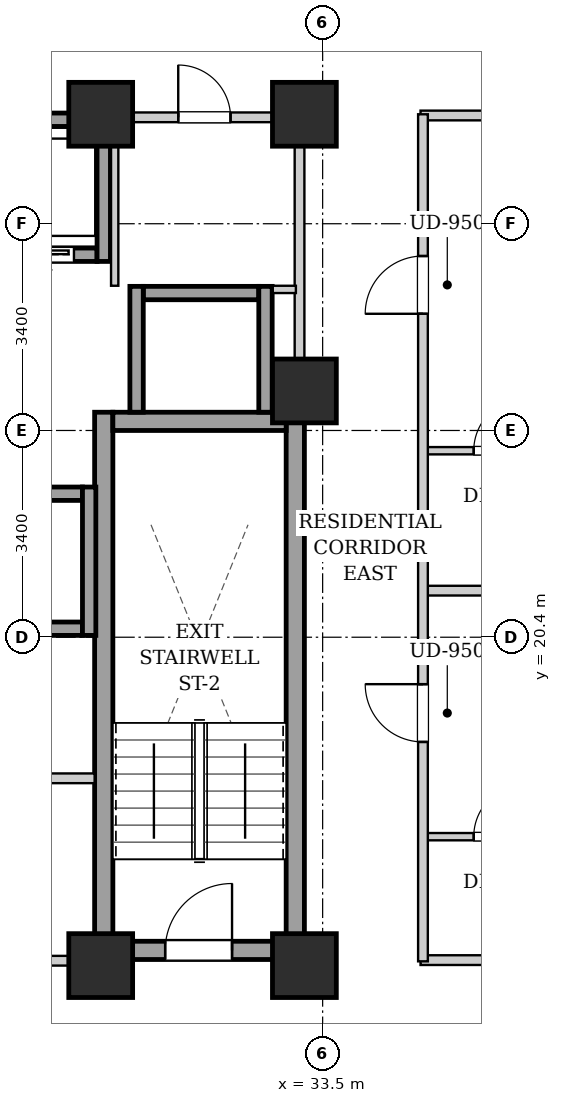
"""IFC4 building model, lengths in metres.
Left out: names, types, materials, properties, quantities, classifications, styles, units other than length and angle.
Written with IfcOpenShell. Run it as: python <this file> out.ifc"""

import sys

from ifc_helpers import new_model, si_unit, direction, frame, frame_2d, origin, origin_2d, place, context, subcontext, project, spatial, rectangle, extrude, element, fill, save


model = new_model("IFC4")
c1 = context("Model", 3, precision=1e-05, world=origin(), true_north=direction((0.0, 1.0)))
c2 = subcontext(c1, "Body", "Model", "MODEL_VIEW")
j1 = project(units=[si_unit("LENGTHUNIT", "METRE"), si_unit("PLANEANGLEUNIT", "RADIAN")], contexts=[c1])
p1 = place(None, origin())
s1 = spatial("IfcSite", under=j1, at=p1, CompositionType="ELEMENT")
p2 = place(p1, origin())
s2 = spatial("IfcBuilding", under=s1, at=p2, CompositionType="ELEMENT")
p3 = place(p2, frame((0.0, 0.0, 107.1)))
s3 = spatial("IfcBuildingStorey", under=s2, at=p3, CompositionType="ELEMENT", Elevation=107.1)
for number, where, z_axis, x_axis in (
    (1, (29.85, 15.0, 0.0), (0.0, 0.0, 1.0), (1.0, 0.0, 0.0)),
    (2, (33.2, 15.0, 0.0), (0.0, 0.0, 1.0), (1.0, 0.0, 0.0)),
    (3, (29.85, 29.0, 0.0), (0.0, 0.0, 1.0), (1.0, 0.0, 0.0)),
    (4, (33.2, 29.0, 0.0), (0.0, 0.0, 1.0), (1.0, 0.0, 0.0)),
    (5, (33.2, 24.45, 0.0), (0.0, 0.0, 1.0), (1.0, 0.0, 0.0)),
):
    element("IfcColumn", number, at=place(p3, frame(where, z_axis=z_axis, x_axis=x_axis)), inside=s3, PredefinedType="COLUMN", context=c2, shape_type="SweptSolid", body=[
        extrude(rectangle(XDim=1.05, YDim=1.05, at=origin_2d()), origin(), (0.0, 0.0, 1.0), 3.2),
    ])
for number, where, z_axis, x_axis in (
    (6, (29.9, 15.1, 0.0), (0.0, 0.0, 1.0), (0.0, 1.0, 0.0)),
    (7, (33.05, 15.1, 0.0), (0.0, 0.0, 1.0), (0.0, 1.0, 0.0)),
):
    element("IfcWall", number, at=place(p3, frame(where, z_axis=z_axis, x_axis=x_axis)), inside=s3, PredefinedType="SHEAR", context=c2, shape_type="SweptSolid", body=[
        extrude(rectangle(XDim=9.0, YDim=0.3, at=frame_2d((4.5, 0.0))), origin(), (0.0, 0.0, 1.0), 2.94),
    ])
p4 = place(p3, frame((30.05, 23.95, 0.0), z_axis=(0.0, 0.0, 1.0), x_axis=(1.0, 0.0, 0.0)))
e8 = element("IfcWall", 8, at=p4, inside=s3, PredefinedType="SHEAR", context=c2, shape_type="SweptSolid", body=[
    extrude(rectangle(XDim=2.85, YDim=0.3, at=frame_2d((1.425, 0.0))), origin(), (0.0, 0.0, 1.0), 2.94),
])
p5 = place(p3, frame((30.05, 15.25, 0.0), z_axis=(0.0, 0.0, 1.0), x_axis=(1.0, 0.0, 0.0)))
e9 = element("IfcWall", 9, at=p5, inside=s3, PredefinedType="SHEAR", context=c2, shape_type="SweptSolid", body=[
    extrude(rectangle(XDim=2.85, YDim=0.3, at=frame_2d((1.425, 0.0))), origin(), (0.0, 0.0, 1.0), 2.94),
])
p6 = place(p5, frame((0.86, 0.0, 0.0)))
e10 = element("IfcOpeningElement", 10, at=p6, cuts=e9, PredefinedType="OPENING", context=c2, shape_type="SweptSolid", body=[
    extrude(rectangle(XDim=1.1, YDim=2.05, at=frame_2d((0.55, 1.025))), frame((0.0, 0.16, 0.0), z_axis=(0.0, -1.0, 0.0), x_axis=(1.0, 0.0, 0.0)), (0.0, 0.0, 1.0), 0.32),
])
p7 = place(p3, frame((27.93, 26.69, 0.0), z_axis=(0.0, 0.0, 1.0), x_axis=(1.0, 0.0, 0.0)))
e11 = element("IfcWall", 11, at=p7, inside=s3, PredefinedType="SHEAR", context=c2, shape_type="SweptSolid", body=[
    extrude(rectangle(XDim=1.86, YDim=0.22, at=frame_2d((0.93, 0.0))), origin(), (0.0, 0.0, 1.0), 2.94),
])
p8 = place(p7, frame((0.38, 0.0, 0.0)))
e12 = element("IfcOpeningElement", 12, at=p8, cuts=e11, PredefinedType="OPENING", context=c2, shape_type="SweptSolid", body=[
    extrude(rectangle(XDim=1.1, YDim=2.15, at=frame_2d((0.55, 1.075))), frame((0.0, 0.12, 0.0), z_axis=(0.0, -1.0, 0.0), x_axis=(1.0, 0.0, 0.0)), (0.0, 0.0, 1.0), 0.24),
])
p9 = place(p3, frame((27.93, 28.91, 0.0), z_axis=(0.0, 0.0, 1.0), x_axis=(1.0, 0.0, 0.0)))
e13 = element("IfcWall", 13, at=p9, inside=s3, PredefinedType="SHEAR", context=c2, shape_type="SweptSolid", body=[
    extrude(rectangle(XDim=1.86, YDim=0.22, at=frame_2d((0.93, 0.0))), origin(), (0.0, 0.0, 1.0), 2.94),
])
p10 = place(p3, frame((29.9, 26.58, 0.0), z_axis=(0.0, 0.0, 1.0), x_axis=(0.0, 1.0, 0.0)))
e14 = element("IfcWall", 14, at=p10, inside=s3, PredefinedType="SHEAR", context=c2, shape_type="SweptSolid", body=[
    extrude(rectangle(XDim=2.44, YDim=0.22, at=frame_2d((1.22, 0.0))), origin(), (0.0, 0.0, 1.0), 2.94),
])
for number, where, z_axis, x_axis in (
    (15, (27.65, 20.54, 0.0), (0.0, 0.0, 1.0), (1.0, 0.0, 0.0)),
    (16, (27.65, 22.76, 0.0), (0.0, 0.0, 1.0), (1.0, 0.0, 0.0)),
):
    element("IfcWall", number, at=place(p3, frame(where, z_axis=z_axis, x_axis=x_axis)), inside=s3, PredefinedType="SHEAR", context=c2, shape_type="SweptSolid", body=[
        extrude(rectangle(XDim=1.9, YDim=0.22, at=frame_2d((0.95, 0.0))), origin(), (0.0, 0.0, 1.0), 2.94),
    ])
p11 = place(p3, frame((29.66, 20.43, 0.0), z_axis=(0.0, 0.0, 1.0), x_axis=(0.0, 1.0, 0.0)))
e17 = element("IfcWall", 17, at=p11, inside=s3, PredefinedType="SHEAR", context=c2, shape_type="SweptSolid", body=[
    extrude(rectangle(XDim=2.44, YDim=0.22, at=frame_2d((1.22, 0.0))), origin(), (0.0, 0.0, 1.0), 2.94),
])
p12 = place(p3, frame((30.55, 26.06, 0.0), z_axis=(0.0, 0.0, 1.0), x_axis=(1.0, 0.0, 0.0)))
e18 = element("IfcWall", 18, at=p12, inside=s3, PredefinedType="SHEAR", context=c2, shape_type="SweptSolid", body=[
    extrude(rectangle(XDim=1.9, YDim=0.22, at=frame_2d((0.95, 0.0))), origin(), (0.0, 0.0, 1.0), 2.94),
])
for number, where, z_axis, x_axis in (
    (19, (30.44, 24.1, 0.0), (0.0, 0.0, 1.0), (0.0, 1.0, 0.0)),
    (20, (32.56, 24.1, 0.0), (0.0, 0.0, 1.0), (0.0, 1.0, 0.0)),
):
    element("IfcWall", number, at=place(p3, frame(where, z_axis=z_axis, x_axis=x_axis)), inside=s3, PredefinedType="SHEAR", context=c2, shape_type="SweptSolid", body=[
        extrude(rectangle(XDim=2.07, YDim=0.22, at=frame_2d((1.035, 0.0))), origin(), (0.0, 0.0, 1.0), 2.94),
    ])
p13 = place(p3, frame((21.25, 15.08, 0.0), z_axis=(0.0, 0.0, 1.0), x_axis=(1.0, 0.0, 0.0)))
e21 = element("IfcWall", 21, at=p13, inside=s3, PredefinedType="PARTITIONING", context=c2, shape_type="SweptSolid", body=[
    extrude(rectangle(XDim=8.5, YDim=0.16, at=frame_2d((4.25, 0.0))), origin(), (0.0, 0.0, 1.0), 2.313),
])
p14 = place(p13, frame((3.725, 0.0, 0.0)))
e22 = element("IfcOpeningElement", 22, at=p14, cuts=e21, PredefinedType="OPENING", context=c2, shape_type="SweptSolid", body=[
    extrude(rectangle(XDim=1.05, YDim=2.05, at=frame_2d((0.525, 1.025))), frame((0.0, 0.09, 0.0), z_axis=(0.0, -1.0, 0.0), x_axis=(1.0, 0.0, 0.0)), (0.0, 0.0, 1.0), 0.18),
])
p15 = place(p3, frame((28.65, 18.08, 0.0), z_axis=(0.0, 0.0, 1.0), x_axis=(1.0, 0.0, 0.0)))
e23 = element("IfcWall", 23, at=p15, inside=s3, PredefinedType="PARTITIONING", context=c2, shape_type="SweptSolid", body=[
    extrude(rectangle(XDim=1.1, YDim=0.16, at=frame_2d((0.55, 0.0))), origin(), (0.0, 0.0, 1.0), 2.94),
])
p16 = place(p3, frame((33.12, 24.12, 0.0), z_axis=(0.0, 0.0, 1.0), x_axis=(0.0, 1.0, 0.0)))
e24 = element("IfcWall", 24, at=p16, inside=s3, PredefinedType="PARTITIONING", context=c2, shape_type="SweptSolid", body=[
    extrude(rectangle(XDim=4.76, YDim=0.16, at=frame_2d((2.38, 0.0))), origin(), (0.0, 0.0, 1.0), 2.275),
])
p17 = place(p3, frame((30.08, 26.18, 0.0), z_axis=(0.0, 0.0, 1.0), x_axis=(0.0, 1.0, 0.0)))
e25 = element("IfcWall", 25, at=p17, inside=s3, PredefinedType="PARTITIONING", context=c2, shape_type="SweptSolid", body=[
    extrude(rectangle(XDim=2.68, YDim=0.12, at=frame_2d((1.34, 0.0))), origin(), (0.0, 0.0, 1.0), 2.94),
])
p18 = place(p3, frame((32.68, 26.12, 0.0), z_axis=(0.0, 0.0, 1.0), x_axis=(1.0, 0.0, 0.0)))
e26 = element("IfcWall", 26, at=p18, inside=s3, PredefinedType="PARTITIONING", context=c2, shape_type="SweptSolid", body=[
    extrude(rectangle(XDim=0.38, YDim=0.12, at=frame_2d((0.19, 0.0))), origin(), (0.0, 0.0, 1.0), 2.94),
])
p19 = place(p3, frame((30.08, 28.95, 0.0), z_axis=(0.0, 0.0, 1.0), x_axis=(1.0, 0.0, 0.0)))
e27 = element("IfcWall", 27, at=p19, inside=s3, PredefinedType="PARTITIONING", context=c2, shape_type="SweptSolid", body=[
    extrude(rectangle(XDim=2.96, YDim=0.16, at=frame_2d((1.48, 0.0))), origin(), (0.0, 0.0, 1.0), 2.94),
])
p20 = place(p19, frame((1.045, 0.0, 0.0)))
e28 = element("IfcOpeningElement", 28, at=p20, cuts=e27, PredefinedType="OPENING", context=c2, shape_type="SweptSolid", body=[
    extrude(rectangle(XDim=0.86, YDim=2.05, at=frame_2d((0.43, 1.025))), frame((0.0, 0.09, 0.0), z_axis=(0.0, -1.0, 0.0), x_axis=(1.0, 0.0, 0.0)), (0.0, 0.0, 1.0), 0.18),
])
for number, where, z_axis, x_axis in (
    (29, (35.11, 15.09, 0.0), (0.0, 0.0, 1.0), (1.0, 0.0, 0.0)),
    (30, (35.11, 28.98, 0.0), (0.0, 0.0, 1.0), (1.0, 0.0, 0.0)),
):
    element("IfcWall", number, at=place(p3, frame(where, z_axis=z_axis, x_axis=x_axis)), inside=s3, PredefinedType="PARTITIONING", context=c2, shape_type="SweptSolid", body=[
        extrude(rectangle(XDim=8.01, YDim=0.16, at=frame_2d((4.005, 0.0))), origin(), (0.0, 0.0, 1.0), 2.313),
    ])
p21 = place(p3, frame((35.19, 21.166, 0.0), z_axis=(0.0, 0.0, 1.0), x_axis=(1.0, 0.0, 0.0)))
e31 = element("IfcWall", 31, at=p21, inside=s3, PredefinedType="PARTITIONING", context=c2, shape_type="SweptSolid", body=[
    extrude(rectangle(XDim=7.93, YDim=0.16, at=frame_2d((3.965, 0.0))), origin(), (0.0, 0.0, 1.0), 2.94),
])
p22 = place(p3, frame((35.19, 17.12, 0.0), z_axis=(0.0, 0.0, 1.0), x_axis=(1.0, 0.0, 0.0)))
e32 = element("IfcWall", 32, at=p22, inside=s3, PredefinedType="PARTITIONING", context=c2, shape_type="SweptSolid", body=[
    extrude(rectangle(XDim=2.45, YDim=0.12, at=frame_2d((1.225, 0.0))), origin(), (0.0, 0.0, 1.0), 2.94),
])
p23 = place(p22, frame((0.795, 0.0, 0.0)))
e33 = element("IfcOpeningElement", 33, at=p23, cuts=e32, PredefinedType="OPENING", context=c2, shape_type="SweptSolid", body=[
    extrude(rectangle(XDim=0.86, YDim=2.05, at=frame_2d((0.43, 1.025))), frame((0.0, 0.07, 0.0), z_axis=(0.0, -1.0, 0.0), x_axis=(1.0, 0.0, 0.0)), (0.0, 0.0, 1.0), 0.14),
])
p24 = place(p3, frame((35.19, 23.467, 0.0), z_axis=(0.0, 0.0, 1.0), x_axis=(1.0, 0.0, 0.0)))
e34 = element("IfcWall", 34, at=p24, inside=s3, PredefinedType="PARTITIONING", context=c2, shape_type="SweptSolid", body=[
    extrude(rectangle(XDim=2.45, YDim=0.12, at=frame_2d((1.225, 0.0))), origin(), (0.0, 0.0, 1.0), 2.94),
])
p25 = place(p24, frame((0.795, 0.0, 0.0)))
e35 = element("IfcOpeningElement", 35, at=p25, cuts=e34, PredefinedType="OPENING", context=c2, shape_type="SweptSolid", body=[
    extrude(rectangle(XDim=0.86, YDim=2.05, at=frame_2d((0.43, 1.025))), frame((0.0, 0.07, 0.0), z_axis=(0.0, -1.0, 0.0), x_axis=(1.0, 0.0, 0.0)), (0.0, 0.0, 1.0), 0.14),
])
p26 = place(p3, frame((35.15, 15.07, 0.0), z_axis=(0.0, 0.0, 1.0), x_axis=(0.0, 1.0, 0.0)))
e36 = element("IfcWall", 36, at=p26, inside=s3, PredefinedType="PARTITIONING", context=c2, shape_type="SweptSolid", body=[
    extrude(rectangle(XDim=13.93, YDim=0.16, at=frame_2d((6.965, 0.0))), origin(), (0.0, 0.0, 1.0), 2.94),
])
p27 = place(p26, frame((3.608, 0.0, 0.0)))
e37 = element("IfcOpeningElement", 37, at=p27, cuts=e36, PredefinedType="OPENING", context=c2, shape_type="SweptSolid", body=[
    extrude(rectangle(XDim=0.95, YDim=2.1, at=frame_2d((0.475, 1.05))), frame((0.0, 0.09, 0.0), z_axis=(0.0, -1.0, 0.0), x_axis=(1.0, 0.0, 0.0)), (0.0, 0.0, 1.0), 0.18),
])
p28 = place(p26, frame((10.649, 0.0, 0.0)))
e38 = element("IfcOpeningElement", 38, at=p28, cuts=e36, PredefinedType="OPENING", context=c2, shape_type="SweptSolid", body=[
    extrude(rectangle(XDim=0.95, YDim=2.1, at=frame_2d((0.475, 1.05))), frame((0.0, 0.09, 0.0), z_axis=(0.0, -1.0, 0.0), x_axis=(1.0, 0.0, 0.0)), (0.0, 0.0, 1.0), 0.18),
])
p29 = place(p6, origin())
e39 = element("IfcDoor", 39, at=p29, inside=s3, OperationType="SINGLE_SWING_RIGHT", PredefinedType="DOOR", context=c2, shape_type="SweptSolid", body=[
    extrude(rectangle(XDim=1.1, YDim=2.05, at=frame_2d((0.55, 1.025))), frame((0.0, 0.025, 0.0), z_axis=(0.0, -1.0, 0.0), x_axis=(1.0, 0.0, 0.0)), (0.0, 0.0, 1.0), 0.05),
])
fill(e10, e39)
p30 = place(p8, origin())
e40 = element("IfcDoor", 40, at=p30, inside=s3, OperationType="SLIDING_TO_LEFT", PredefinedType="DOOR", context=c2, shape_type="SweptSolid", body=[
    extrude(rectangle(XDim=1.1, YDim=2.15, at=frame_2d((0.55, 1.075))), frame((0.0, 0.025, 0.0), z_axis=(0.0, -1.0, 0.0), x_axis=(1.0, 0.0, 0.0)), (0.0, 0.0, 1.0), 0.05),
])
fill(e12, e40)
p31 = place(p20, origin())
e41 = element("IfcDoor", 41, at=p31, inside=s3, OperationType="SINGLE_SWING_LEFT", PredefinedType="DOOR", context=c2, shape_type="SweptSolid", body=[
    extrude(rectangle(XDim=0.86, YDim=2.05, at=frame_2d((0.43, 1.025))), frame((0.0, 0.025, 0.0), z_axis=(0.0, -1.0, 0.0), x_axis=(1.0, 0.0, 0.0)), (0.0, 0.0, 1.0), 0.05),
])
fill(e28, e41)
p32 = place(p23, origin())
e42 = element("IfcDoor", 42, at=p32, inside=s3, OperationType="SINGLE_SWING_RIGHT", PredefinedType="DOOR", context=c2, shape_type="SweptSolid", body=[
    extrude(rectangle(XDim=0.86, YDim=2.05, at=frame_2d((0.43, 1.025))), frame((0.0, 0.025, 0.0), z_axis=(0.0, -1.0, 0.0), x_axis=(1.0, 0.0, 0.0)), (0.0, 0.0, 1.0), 0.05),
])
fill(e33, e42)
p33 = place(p25, origin())
e43 = element("IfcDoor", 43, at=p33, inside=s3, OperationType="SINGLE_SWING_RIGHT", PredefinedType="DOOR", context=c2, shape_type="SweptSolid", body=[
    extrude(rectangle(XDim=0.86, YDim=2.05, at=frame_2d((0.43, 1.025))), frame((0.0, 0.025, 0.0), z_axis=(0.0, -1.0, 0.0), x_axis=(1.0, 0.0, 0.0)), (0.0, 0.0, 1.0), 0.05),
])
fill(e35, e43)
p34 = place(p27, origin())
e44 = element("IfcDoor", 44, at=p34, inside=s3, OperationType="SINGLE_SWING_RIGHT", PredefinedType="DOOR", context=c2, shape_type="SweptSolid", body=[
    extrude(rectangle(XDim=0.95, YDim=2.1, at=frame_2d((0.475, 1.05))), frame((0.0, 0.025, 0.0), z_axis=(0.0, -1.0, 0.0), x_axis=(1.0, 0.0, 0.0)), (0.0, 0.0, 1.0), 0.05),
])
fill(e37, e44)
p35 = place(p28, origin())
e45 = element("IfcDoor", 45, at=p35, inside=s3, OperationType="SINGLE_SWING_LEFT", PredefinedType="DOOR", context=c2, shape_type="SweptSolid", body=[
    extrude(rectangle(XDim=0.95, YDim=2.1, at=frame_2d((0.475, 1.05))), frame((0.0, 0.025, 0.0), z_axis=(0.0, -1.0, 0.0), x_axis=(1.0, 0.0, 0.0)), (0.0, 0.0, 1.0), 0.05),
])
fill(e38, e45)
save(model, sys.argv[1])
